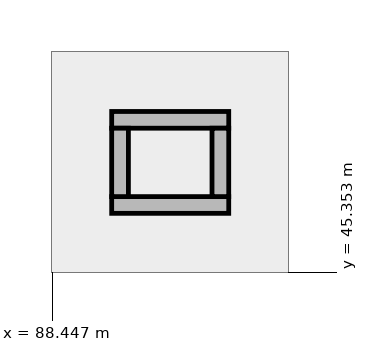
"""IFC4 building model, lengths in metres.
Left out: names, types, materials, properties, quantities, classifications, styles, units other than length and angle.
Written with IfcOpenShell. Run it as: python <this file> out.ifc"""

import sys

from ifc_helpers import new_model, si_unit, direction, frame, frame_2d, origin, place, context, subcontext, project, spatial, rectangle, extrude, element, save


model = new_model("IFC4")
c1 = context("Model", 3, precision=1e-05, world=origin(), true_north=direction((0.0, 1.0)))
c2 = subcontext(c1, "Body", "Model", "MODEL_VIEW")
j1 = project(units=[si_unit("LENGTHUNIT", "METRE"), si_unit("PLANEANGLEUNIT", "RADIAN")], contexts=[c1])
p1 = place(None, origin())
s1 = spatial("IfcSite", under=j1, at=p1, CompositionType="ELEMENT")
p2 = place(p1, origin())
s2 = spatial("IfcBuilding", under=s1, at=p2, CompositionType="ELEMENT")
p3 = place(p2, frame((0.0, 0.0, -4.5)))
s3 = spatial("IfcBuildingStorey", under=s2, at=p3, CompositionType="ELEMENT", Elevation=-4.5)
for number, where, z_axis, x_axis in (
    (1, (89.23, 46.24, 0.0), (0.0, 0.0, 1.0), (1.0, 0.0, 0.0)),
    (2, (89.23, 47.36, 0.0), (0.0, 0.0, 1.0), (1.0, 0.0, 0.0)),
):
    element("IfcWall", number, at=place(p3, frame(where, z_axis=z_axis, x_axis=x_axis)), inside=s3, PredefinedType="STANDARD", context=c2, shape_type="SweptSolid", body=[
        extrude(rectangle(XDim=1.54, YDim=0.22, at=frame_2d((0.77, 0.0))), origin(), (0.0, 0.0, 1.0), 3.19),
    ])
for number, where, z_axis, x_axis in (
    (3, (89.34, 46.35, 0.0), (0.0, 0.0, 1.0), (0.0, 1.0, 0.0)),
    (4, (90.66, 46.35, 0.0), (0.0, 0.0, 1.0), (0.0, 1.0, 0.0)),
):
    element("IfcWall", number, at=place(p3, frame(where, z_axis=z_axis, x_axis=x_axis)), inside=s3, PredefinedType="STANDARD", context=c2, shape_type="SweptSolid", body=[
        extrude(rectangle(XDim=0.9, YDim=0.22, at=frame_2d((0.45, 0.0))), origin(), (0.0, 0.0, 1.0), 3.19),
    ])
save(model, sys.argv[1])
